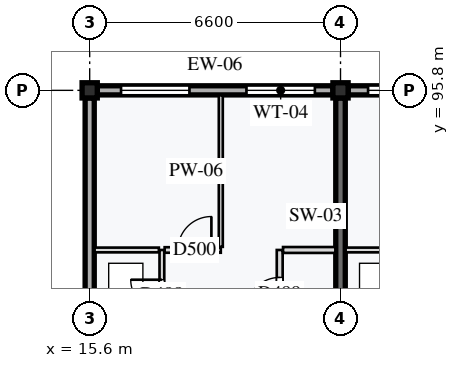
"""IFC4 building model, lengths in metres.
Left out: names, types, materials, properties, quantities, classifications, styles, units other than length and angle.
Written with IfcOpenShell. Run it as: python <this file> out.ifc"""

import sys

from ifc_helpers import new_model, si_unit, direction, frame, frame_2d, origin, origin_2d, place, context, subcontext, project, spatial, rectangle, extrude, element, fill, save


model = new_model("IFC4")
c1 = context("Model", 3, precision=1e-05, world=origin(), true_north=direction((0.0, 1.0)))
c2 = subcontext(c1, "Body", "Model", "MODEL_VIEW")
j1 = project(units=[si_unit("LENGTHUNIT", "METRE"), si_unit("PLANEANGLEUNIT", "RADIAN")], contexts=[c1])
p1 = place(None, origin())
s1 = spatial("IfcSite", under=j1, at=p1, CompositionType="ELEMENT")
p2 = place(p1, origin())
s2 = spatial("IfcBuilding", under=s1, at=p2, CompositionType="ELEMENT")
p3 = place(p2, frame((0.0, 0.0, 50.0)))
s3 = spatial("IfcBuildingStorey", under=s2, at=p3, CompositionType="ELEMENT", Elevation=50.0)
for number, where, z_axis, x_axis in (
    (1, (15.6, 95.8, 0.0), (0.0, 0.0, 1.0), (1.0, 0.0, 0.0)),
    (2, (22.2, 95.8, 0.0), (0.0, 0.0, 1.0), (1.0, 0.0, 0.0)),
):
    element("IfcColumn", number, at=place(p3, frame(where, z_axis=z_axis, x_axis=x_axis)), inside=s3, PredefinedType="COLUMN", context=c2, shape_type="SweptSolid", body=[
        extrude(rectangle(XDim=0.4, YDim=0.4, at=origin_2d()), origin(), (0.0, 0.0, 1.0), 3.2),
    ])
p4 = place(p3, frame((22.2, 89.4, 0.0), z_axis=(0.0, 0.0, 1.0), x_axis=(0.0, 1.0, 0.0)))
e3 = element("IfcWall", 3, at=p4, inside=s3, PredefinedType="SHEAR", context=c2, shape_type="SweptSolid", body=[
    extrude(rectangle(XDim=6.2, YDim=0.25, at=frame_2d((3.1, 0.0))), origin(), (0.0, 0.0, 1.0), 2.98),
])
p5 = place(p3, frame((15.8, 95.8, 0.0), z_axis=(0.0, 0.0, 1.0), x_axis=(1.0, 0.0, 0.0)))
e4 = element("IfcWall", 4, at=p5, inside=s3, PredefinedType="STANDARD", context=c2, shape_type="SweptSolid", body=[
    extrude(rectangle(XDim=6.2, YDim=0.24, at=frame_2d((3.1, 0.0))), origin(), (0.0, 0.0, 1.0), 2.6),
])
p6 = place(p5, frame((0.625, 0.0, 0.85)))
e5 = element("IfcOpeningElement", 5, at=p6, cuts=e4, PredefinedType="OPENING", context=c2, shape_type="SweptSolid", body=[
    extrude(rectangle(XDim=1.8, YDim=1.35, at=frame_2d((0.9, 0.675))), frame((0.0, 0.13, 0.0), z_axis=(0.0, -1.0, 0.0), x_axis=(1.0, 0.0, 0.0)), (0.0, 0.0, 1.0), 0.26),
])
p7 = place(p5, frame((3.925, 0.0, 0.85)))
e6 = element("IfcOpeningElement", 6, at=p7, cuts=e4, PredefinedType="OPENING", context=c2, shape_type="SweptSolid", body=[
    extrude(rectangle(XDim=1.8, YDim=1.55, at=frame_2d((0.9, 0.775))), frame((0.0, 0.13, 0.0), z_axis=(0.0, -1.0, 0.0), x_axis=(1.0, 0.0, 0.0)), (0.0, 0.0, 1.0), 0.26),
])
p8 = place(p3, frame((22.4, 95.8, 0.0), z_axis=(0.0, 0.0, 1.0), x_axis=(1.0, 0.0, 0.0)))
e7 = element("IfcWall", 7, at=p8, inside=s3, PredefinedType="STANDARD", context=c2, shape_type="SweptSolid", body=[
    extrude(rectangle(XDim=6.2, YDim=0.24, at=frame_2d((3.1, 0.0))), origin(), (0.0, 0.0, 1.0), 2.6),
])
p9 = place(p8, frame((0.525, 0.0, 0.85)))
e8 = element("IfcOpeningElement", 8, at=p9, cuts=e7, PredefinedType="OPENING", context=c2, shape_type="SweptSolid", body=[
    extrude(rectangle(XDim=1.8, YDim=1.35, at=frame_2d((0.9, 0.675))), frame((0.0, 0.13, 0.0), z_axis=(0.0, -1.0, 0.0), x_axis=(1.0, 0.0, 0.0)), (0.0, 0.0, 1.0), 0.26),
])
p10 = place(p8, frame((3.95, 0.0, 0.85)))
e9 = element("IfcOpeningElement", 9, at=p10, cuts=e7, PredefinedType="OPENING", context=c2, shape_type="SweptSolid", body=[
    extrude(rectangle(XDim=1.8, YDim=1.35, at=frame_2d((0.9, 0.675))), frame((0.0, 0.13, 0.0), z_axis=(0.0, -1.0, 0.0), x_axis=(1.0, 0.0, 0.0)), (0.0, 0.0, 1.0), 0.26),
])
p11 = place(p3, frame((15.6, 89.4, 0.0), z_axis=(0.0, 0.0, 1.0), x_axis=(0.0, 1.0, 0.0)))
e10 = element("IfcWall", 10, at=p11, inside=s3, PredefinedType="STANDARD", context=c2, shape_type="SweptSolid", body=[
    extrude(rectangle(XDim=6.2, YDim=0.24, at=frame_2d((3.1, 0.0))), origin(), (0.0, 0.0, 1.0), 2.65),
])
p12 = place(p3, frame((17.5, 89.298, 0.0), z_axis=(0.0, 0.0, 1.0), x_axis=(0.0, 1.0, 0.0)))
e11 = element("IfcWall", 11, at=p12, inside=s3, PredefinedType="PARTITIONING", context=c2, shape_type="SweptSolid", body=[
    extrude(rectangle(XDim=2.302, YDim=0.125, at=frame_2d((1.151, 0.0))), origin(), (0.0, 0.0, 1.0), 2.98),
])
p13 = place(p12, frame((0.7, 0.0, 0.0)))
e12 = element("IfcOpeningElement", 12, at=p13, cuts=e11, PredefinedType="OPENING", context=c2, shape_type="SweptSolid", body=[
    extrude(rectangle(XDim=0.82, YDim=2.05, at=frame_2d((0.41, 1.025))), frame((0.0, 0.073, 0.0), z_axis=(0.0, -1.0, 0.0), x_axis=(1.0, 0.0, 0.0)), (0.0, 0.0, 1.0), 0.145),
])
p14 = place(p3, frame((15.73, 91.6, 0.0), z_axis=(0.0, 0.0, 1.0), x_axis=(1.0, 0.0, 0.0)))
e13 = element("IfcWall", 13, at=p14, inside=s3, PredefinedType="PARTITIONING", context=c2, shape_type="SweptSolid", body=[
    extrude(rectangle(XDim=1.69, YDim=0.125, at=frame_2d((0.845, 0.0))), origin(), (0.0, 0.0, 1.0), 2.98),
])
p15 = place(p3, frame((20.6, 89.298, 0.0), z_axis=(0.0, 0.0, 1.0), x_axis=(0.0, 1.0, 0.0)))
e14 = element("IfcWall", 14, at=p15, inside=s3, PredefinedType="PARTITIONING", context=c2, shape_type="SweptSolid", body=[
    extrude(rectangle(XDim=2.302, YDim=0.155, at=frame_2d((1.151, 0.0))), origin(), (0.0, 0.0, 1.0), 2.98),
])
p16 = place(p15, frame((0.7, 0.0, 0.0)))
e15 = element("IfcOpeningElement", 15, at=p16, cuts=e14, PredefinedType="OPENING", context=c2, shape_type="SweptSolid", body=[
    extrude(rectangle(XDim=0.88, YDim=2.1, at=frame_2d((0.44, 1.05))), frame((0.0, 0.087, 0.0), z_axis=(0.0, -1.0, 0.0), x_axis=(1.0, 0.0, 0.0)), (0.0, 0.0, 1.0), 0.175),
])
p17 = place(p3, frame((20.688, 91.6, 0.0), z_axis=(0.0, 0.0, 1.0), x_axis=(1.0, 0.0, 0.0)))
e16 = element("IfcWall", 16, at=p17, inside=s3, PredefinedType="PARTITIONING", context=c2, shape_type="SweptSolid", body=[
    extrude(rectangle(XDim=1.377, YDim=0.155, at=frame_2d((0.689, 0.0))), origin(), (0.0, 0.0, 1.0), 2.98),
])
p18 = place(p3, frame((17.573, 91.6, 0.0), z_axis=(0.0, 0.0, 1.0), x_axis=(1.0, 0.0, 0.0)))
e17 = element("IfcWall", 17, at=p18, inside=s3, PredefinedType="PARTITIONING", context=c2, shape_type="SweptSolid", body=[
    extrude(rectangle(XDim=1.478, YDim=0.145, at=frame_2d((0.739, 0.0))), origin(), (0.0, 0.0, 1.0), 2.98),
])
p19 = place(p18, frame((0.35, 0.0, 0.0)))
e18 = element("IfcOpeningElement", 18, at=p19, cuts=e17, PredefinedType="OPENING", context=c2, shape_type="SweptSolid", body=[
    extrude(rectangle(XDim=0.88, YDim=2.16, at=frame_2d((0.44, 1.08))), frame((0.0, 0.083, 0.0), z_axis=(0.0, -1.0, 0.0), x_axis=(1.0, 0.0, 0.0)), (0.0, 0.0, 1.0), 0.165),
])
p20 = place(p3, frame((19.05, 91.683, 0.0), z_axis=(0.0, 0.0, 1.0), x_axis=(0.0, 1.0, 0.0)))
e19 = element("IfcWall", 19, at=p20, inside=s3, PredefinedType="PARTITIONING", context=c2, shape_type="SweptSolid", body=[
    extrude(rectangle(XDim=3.987, YDim=0.105, at=frame_2d((1.994, 0.0))), origin(), (0.0, 0.0, 1.0), 2.98),
])
p21 = place(p3, frame((22.335, 91.6, 0.0), z_axis=(0.0, 0.0, 1.0), x_axis=(1.0, 0.0, 0.0)))
e20 = element("IfcWall", 20, at=p21, inside=s3, PredefinedType="PARTITIONING", context=c2, shape_type="SweptSolid", body=[
    extrude(rectangle(XDim=1.685, YDim=0.125, at=frame_2d((0.843, 0.0))), origin(), (0.0, 0.0, 1.0), 2.98),
])
p22 = place(p6, origin())
e21 = element("IfcWindow", 21, at=p22, inside=s3, PartitioningType="SINGLE_PANEL", PredefinedType="WINDOW", context=c2, shape_type="SweptSolid", body=[
    extrude(rectangle(XDim=1.8, YDim=1.35, at=frame_2d((0.9, 0.675))), frame((0.0, 0.03, 0.0), z_axis=(0.0, -1.0, 0.0), x_axis=(1.0, 0.0, 0.0)), (0.0, 0.0, 1.0), 0.06),
])
fill(e5, e21)
p23 = place(p7, origin())
e22 = element("IfcWindow", 22, at=p23, inside=s3, PartitioningType="SINGLE_PANEL", PredefinedType="WINDOW", context=c2, shape_type="SweptSolid", body=[
    extrude(rectangle(XDim=1.8, YDim=1.55, at=frame_2d((0.9, 0.775))), frame((0.0, 0.03, 0.0), z_axis=(0.0, -1.0, 0.0), x_axis=(1.0, 0.0, 0.0)), (0.0, 0.0, 1.0), 0.06),
])
fill(e6, e22)
p24 = place(p9, origin())
e23 = element("IfcWindow", 23, at=p24, inside=s3, PartitioningType="SINGLE_PANEL", PredefinedType="WINDOW", context=c2, shape_type="SweptSolid", body=[
    extrude(rectangle(XDim=1.8, YDim=1.35, at=frame_2d((0.9, 0.675))), frame((0.0, 0.03, 0.0), z_axis=(0.0, -1.0, 0.0), x_axis=(1.0, 0.0, 0.0)), (0.0, 0.0, 1.0), 0.06),
])
fill(e8, e23)
p25 = place(p13, origin())
e24 = element("IfcDoor", 24, at=p25, inside=s3, OperationType="SINGLE_SWING_RIGHT", PredefinedType="DOOR", context=c2, shape_type="SweptSolid", body=[
    extrude(rectangle(XDim=0.82, YDim=2.05, at=frame_2d((0.41, 1.025))), frame((0.0, 0.025, 0.0), z_axis=(0.0, -1.0, 0.0), x_axis=(1.0, 0.0, 0.0)), (0.0, 0.0, 1.0), 0.05),
])
fill(e12, e24)
p26 = place(p16, origin())
e25 = element("IfcDoor", 25, at=p26, inside=s3, OperationType="SINGLE_SWING_LEFT", PredefinedType="DOOR", context=c2, shape_type="SweptSolid", body=[
    extrude(rectangle(XDim=0.88, YDim=2.1, at=frame_2d((0.44, 1.05))), frame((0.0, 0.025, 0.0), z_axis=(0.0, -1.0, 0.0), x_axis=(1.0, 0.0, 0.0)), (0.0, 0.0, 1.0), 0.05),
])
fill(e15, e25)
p27 = place(p19, origin())
e26 = element("IfcDoor", 26, at=p27, inside=s3, OperationType="SINGLE_SWING_RIGHT", PredefinedType="DOOR", context=c2, shape_type="SweptSolid", body=[
    extrude(rectangle(XDim=0.88, YDim=2.16, at=frame_2d((0.44, 1.08))), frame((0.0, 0.025, 0.0), z_axis=(0.0, -1.0, 0.0), x_axis=(1.0, 0.0, 0.0)), (0.0, 0.0, 1.0), 0.05),
])
fill(e18, e26)
save(model, sys.argv[1])
